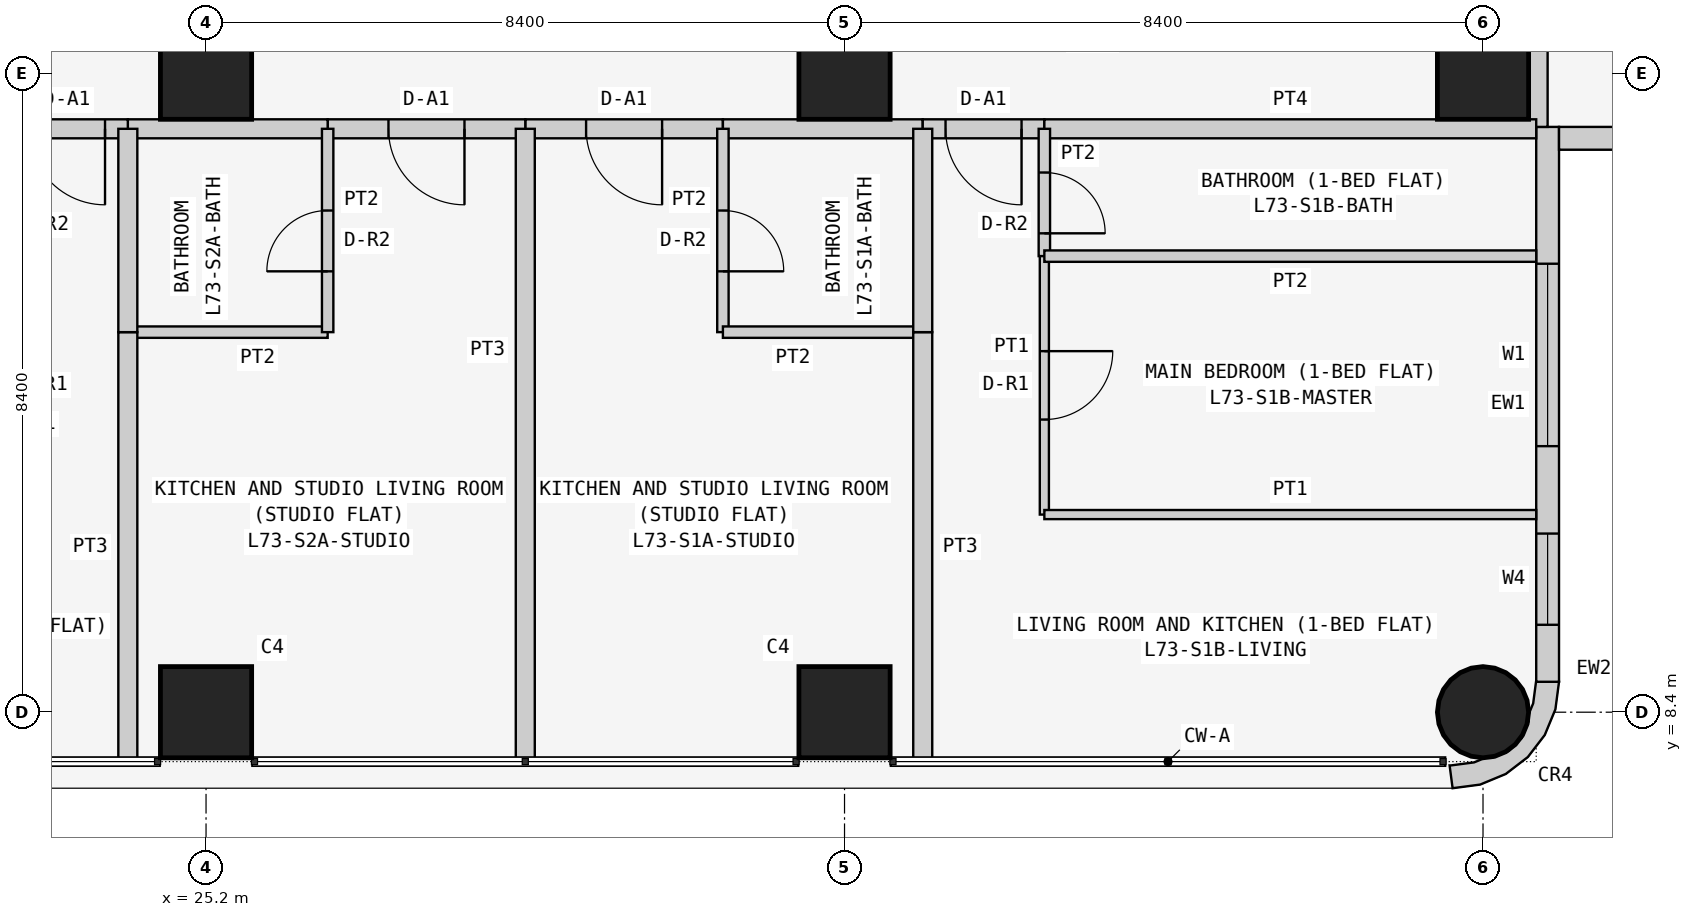
"""IFC4 building model, lengths in metres.
Left out: names, types, materials, properties, quantities, classifications, styles, units other than length and angle.
Written with IfcOpenShell. Run it as: python <this file> out.ifc"""

import sys

from ifc_helpers import new_model, si_unit, direction, frame, frame_2d, origin, origin_2d, place, context, subcontext, project, spatial, polyline, rectangle, circle, outline, extrude, element, fill, save


model = new_model("IFC4")
c1 = context("Model", 3, precision=1e-05, world=origin(), true_north=direction((0.0, 1.0)))
c2 = subcontext(c1, "Body", "Model", "MODEL_VIEW")
j1 = project(units=[si_unit("LENGTHUNIT", "METRE"), si_unit("PLANEANGLEUNIT", "RADIAN")], contexts=[c1])
p1 = place(None, origin())
s1 = spatial("IfcSite", under=j1, at=p1, CompositionType="ELEMENT")
p2 = place(p1, origin())
s2 = spatial("IfcBuilding", under=s1, at=p2, CompositionType="ELEMENT")
p3 = place(p2, frame((0.0, 0.0, 279.3)))
s3 = spatial("IfcBuildingStorey", under=s2, at=p3, CompositionType="ELEMENT", Elevation=279.3)
for number, where, z_axis, x_axis in (
    (1, (25.2, 8.4, 0.0), (0.0, 0.0, 1.0), (1.0, 0.0, 0.0)),
    (2, (25.2, 16.8, 0.0), (0.0, 0.0, 1.0), (1.0, 0.0, 0.0)),
    (3, (33.6, 8.4, 0.0), (0.0, 0.0, 1.0), (1.0, 0.0, 0.0)),
    (4, (33.6, 16.8, 0.0), (0.0, 0.0, 1.0), (1.0, 0.0, 0.0)),
):
    element("IfcColumn", number, at=place(p3, frame(where, z_axis=z_axis, x_axis=x_axis)), inside=s3, PredefinedType="COLUMN", context=c2, shape_type="SweptSolid", body=[
        extrude(rectangle(XDim=1.2, YDim=1.2, at=origin_2d()), origin(), (0.0, 0.0, 1.0), 3.6),
    ])
p4 = place(p3, frame((42.0, 8.4, 0.0), z_axis=(0.0, 0.0, 1.0), x_axis=(1.0, 0.0, 0.0)))
e5 = element("IfcColumn", 5, at=p4, inside=s3, PredefinedType="COLUMN", context=c2, shape_type="SweptSolid", body=[
    extrude(circle(Radius=0.6, at=origin_2d()), origin(), (0.0, 0.0, 1.0), 3.6),
])
p5 = place(p3, frame((42.0, 16.8, 0.0), z_axis=(0.0, 0.0, 1.0), x_axis=(1.0, 0.0, 0.0)))
e6 = element("IfcColumn", 6, at=p5, inside=s3, PredefinedType="COLUMN", context=c2, shape_type="SweptSolid", body=[
    extrude(rectangle(XDim=1.2, YDim=1.2, at=origin_2d()), origin(), (0.0, 0.0, 1.0), 3.6),
])
p6 = place(p3, frame((42.85, 8.8, 0.0), z_axis=(0.0, 0.0, 1.0), x_axis=(0.0, 1.0, 0.0)))
e7 = element("IfcWall", 7, at=p6, inside=s3, PredefinedType="SOLIDWALL", context=c2, shape_type="SweptSolid", body=[
    extrude(rectangle(XDim=7.3, YDim=0.3, at=frame_2d((3.65, 0.0))), origin(), (0.0, 0.0, 1.0), 3.45),
])
p7 = place(p6, frame((3.1, 0.0, 0.9)))
e8 = element("IfcOpeningElement", 8, at=p7, cuts=e7, PredefinedType="OPENING", context=c2, shape_type="SweptSolid", body=[
    extrude(rectangle(XDim=2.4, YDim=1.5, at=frame_2d((1.2, 0.75))), frame((0.0, 0.16, 0.0), z_axis=(0.0, -1.0, 0.0), x_axis=(1.0, 0.0, 0.0)), (0.0, 0.0, 1.0), 0.32),
])
p8 = place(p6, frame((0.75, 0.0, 0.9)))
e9 = element("IfcOpeningElement", 9, at=p8, cuts=e7, PredefinedType="OPENING", context=c2, shape_type="SweptSolid", body=[
    extrude(rectangle(XDim=1.2, YDim=1.5, at=frame_2d((0.6, 0.75))), frame((0.0, 0.16, 0.0), z_axis=(0.0, -1.0, 0.0), x_axis=(1.0, 0.0, 0.0)), (0.0, 0.0, 1.0), 0.32),
])
p9 = place(p3, frame((43.0, 15.95, 0.0), z_axis=(0.0, 0.0, 1.0), x_axis=(1.0, 0.0, 0.0)))
e10 = element("IfcWall", 10, at=p9, inside=s3, PredefinedType="SOLIDWALL", context=c2, shape_type="SweptSolid", body=[
    extrude(rectangle(XDim=7.0, YDim=0.3, at=frame_2d((3.5, 0.0))), origin(), (0.0, 0.0, 1.0), 3.45),
])
p10 = place(p9, frame((1.5, 0.0, 0.9)))
e11 = element("IfcOpeningElement", 11, at=p10, cuts=e10, PredefinedType="OPENING", context=c2, shape_type="SweptSolid", body=[
    extrude(rectangle(XDim=2.4, YDim=1.5, at=frame_2d((1.2, 0.75))), frame((0.0, 0.16, 0.0), z_axis=(0.0, -1.0, 0.0), x_axis=(1.0, 0.0, 0.0)), (0.0, 0.0, 1.0), 0.32),
])
p11 = place(p9, frame((5.05, 0.0, 0.9)))
e12 = element("IfcOpeningElement", 12, at=p11, cuts=e10, PredefinedType="OPENING", context=c2, shape_type="SweptSolid", body=[
    extrude(rectangle(XDim=1.2, YDim=1.5, at=frame_2d((0.6, 0.75))), frame((0.0, 0.16, 0.0), z_axis=(0.0, -1.0, 0.0), x_axis=(1.0, 0.0, 0.0)), (0.0, 0.0, 1.0), 0.32),
])
p12 = place(p3, frame((41.638, 7.824, 0.0), z_axis=(0.0, 0.0, 1.0), x_axis=(0.707106781187, -0.707106781187, 0.0)))
e13 = element("IfcWall", 13, at=p12, inside=s3, PredefinedType="SOLIDWALL", context=c2, shape_type="SweptSolid", body=[
    extrude(outline(polyline([(0.033, 1.469), (0.047, 1.455), (0.233, 1.212), (0.292, 1.069), (0.358, 1.003), (0.449, 0.782), (0.449, 0.543), (0.358, 0.322), (0.292, 0.257), (0.233, 0.114), (0.047, -0.129), (0.033, -0.143), (0.273, -0.327), (0.495, -0.037), (0.635, 0.301), (0.683, 0.663), (0.635, 1.025), (0.495, 1.363), (0.273, 1.653), (0.033, 1.469)])), origin(), (0.0, 0.0, 1.0), 3.45),
])
p13 = place(p3, frame((42.725, 22.971, 0.0), z_axis=(0.0, 0.0, 1.0), x_axis=(0.0, -1.0, 0.0)))
e14 = element("IfcWall", 14, at=p13, inside=s3, PredefinedType="PARTITIONING", context=c2, shape_type="SweptSolid", body=[
    extrude(rectangle(XDim=6.871, YDim=0.25, at=frame_2d((3.436, 0.0))), origin(), (0.0, 0.0, 1.0), 3.45),
])
p14 = place(p3, frame((32.0, 16.075, 0.0), z_axis=(0.0, 0.0, 1.0), x_axis=(-1.0, 0.0, 0.0)))
e15 = element("IfcWall", 15, at=p14, inside=s3, PredefinedType="PARTITIONING", context=c2, shape_type="SweptSolid", body=[
    extrude(rectangle(XDim=2.6, YDim=0.25, at=frame_2d((1.3, 0.0))), origin(), (0.0, 0.0, 1.0), 3.45),
])
p15 = place(p14, frame((0.8, 0.0, 0.0)))
e16 = element("IfcOpeningElement", 16, at=p15, cuts=e15, PredefinedType="OPENING", context=c2, shape_type="SweptSolid", body=[
    extrude(rectangle(XDim=1.0, YDim=2.1, at=frame_2d((0.5, 1.05))), frame((0.0, 0.135, 0.0), z_axis=(0.0, -1.0, 0.0), x_axis=(1.0, 0.0, 0.0)), (0.0, 0.0, 1.0), 0.27),
])
p16 = place(p3, frame((34.629, 16.075, 0.0), z_axis=(0.0, 0.0, 1.0), x_axis=(-1.0, 0.0, 0.0)))
e17 = element("IfcWall", 17, at=p16, inside=s3, PredefinedType="PARTITIONING", context=c2, shape_type="SweptSolid", body=[
    extrude(rectangle(XDim=2.629, YDim=0.25, at=frame_2d((1.314, 0.0))), origin(), (0.0, 0.0, 1.0), 3.45),
])
p17 = place(p3, frame((36.229, 16.075, 0.0), z_axis=(0.0, 0.0, 1.0), x_axis=(-1.0, 0.0, 0.0)))
e18 = element("IfcWall", 18, at=p17, inside=s3, PredefinedType="PARTITIONING", context=c2, shape_type="SweptSolid", body=[
    extrude(rectangle(XDim=1.6, YDim=0.25, at=frame_2d((0.8, 0.0))), origin(), (0.0, 0.0, 1.0), 3.45),
])
p18 = place(p17, frame((0.3, 0.0, 0.0)))
e19 = element("IfcOpeningElement", 19, at=p18, cuts=e18, PredefinedType="OPENING", context=c2, shape_type="SweptSolid", body=[
    extrude(rectangle(XDim=1.0, YDim=2.1, at=frame_2d((0.5, 1.05))), frame((0.0, 0.135, 0.0), z_axis=(0.0, -1.0, 0.0), x_axis=(1.0, 0.0, 0.0)), (0.0, 0.0, 1.0), 0.27),
])
p19 = place(p3, frame((42.7, 16.075, 0.0), z_axis=(0.0, 0.0, 1.0), x_axis=(-1.0, 0.0, 0.0)))
e20 = element("IfcWall", 20, at=p19, inside=s3, PredefinedType="PARTITIONING", context=c2, shape_type="SweptSolid", body=[
    extrude(rectangle(XDim=6.471, YDim=0.25, at=frame_2d((3.235, 0.0))), origin(), (0.0, 0.0, 1.0), 3.45),
])
p20 = place(p3, frame((29.4, 16.075, 0.0), z_axis=(0.0, 0.0, 1.0), x_axis=(-1.0, 0.0, 0.0)))
e21 = element("IfcWall", 21, at=p20, inside=s3, PredefinedType="PARTITIONING", context=c2, shape_type="SweptSolid", body=[
    extrude(rectangle(XDim=2.6, YDim=0.25, at=frame_2d((1.3, 0.0))), origin(), (0.0, 0.0, 1.0), 3.45),
])
p21 = place(p20, frame((0.8, 0.0, 0.0)))
e22 = element("IfcOpeningElement", 22, at=p21, cuts=e21, PredefinedType="OPENING", context=c2, shape_type="SweptSolid", body=[
    extrude(rectangle(XDim=1.0, YDim=2.1, at=frame_2d((0.5, 1.05))), frame((0.0, 0.135, 0.0), z_axis=(0.0, -1.0, 0.0), x_axis=(1.0, 0.0, 0.0)), (0.0, 0.0, 1.0), 0.27),
])
p22 = place(p3, frame((26.8, 16.075, 0.0), z_axis=(0.0, 0.0, 1.0), x_axis=(-1.0, 0.0, 0.0)))
e23 = element("IfcWall", 23, at=p22, inside=s3, PredefinedType="PARTITIONING", context=c2, shape_type="SweptSolid", body=[
    extrude(rectangle(XDim=2.629, YDim=0.25, at=frame_2d((1.314, 0.0))), origin(), (0.0, 0.0, 1.0), 3.45),
])
p23 = place(p3, frame((24.171, 16.075, 0.0), z_axis=(0.0, 0.0, 1.0), x_axis=(-1.0, 0.0, 0.0)))
e24 = element("IfcWall", 24, at=p23, inside=s3, PredefinedType="PARTITIONING", context=c2, shape_type="SweptSolid", body=[
    extrude(rectangle(XDim=1.6, YDim=0.25, at=frame_2d((0.8, 0.0))), origin(), (0.0, 0.0, 1.0), 3.45),
])
p24 = place(p23, frame((0.3, 0.0, 0.0)))
e25 = element("IfcOpeningElement", 25, at=p24, cuts=e24, PredefinedType="OPENING", context=c2, shape_type="SweptSolid", body=[
    extrude(rectangle(XDim=1.0, YDim=2.1, at=frame_2d((0.5, 1.05))), frame((0.0, 0.135, 0.0), z_axis=(0.0, -1.0, 0.0), x_axis=(1.0, 0.0, 0.0)), (0.0, 0.0, 1.0), 0.27),
])
p25 = place(p3, frame((32.0, 16.075, 0.0), z_axis=(0.0, 0.0, 1.0), x_axis=(0.0, -1.0, 0.0)))
e26 = element("IfcWall", 26, at=p25, inside=s3, PredefinedType="PARTITIONING", context=c2, shape_type="SweptSolid", body=[
    extrude(rectangle(XDim=2.675, YDim=0.15, at=frame_2d((1.337, 0.0))), origin(), (0.0, 0.0, 1.0), 3.45),
])
p26 = place(p25, frame((1.075, 0.0, 0.0)))
e27 = element("IfcOpeningElement", 27, at=p26, cuts=e26, PredefinedType="OPENING", context=c2, shape_type="SweptSolid", body=[
    extrude(rectangle(XDim=0.8, YDim=2.1, at=frame_2d((0.4, 1.05))), frame((0.0, 0.085, 0.0), z_axis=(0.0, -1.0, 0.0), x_axis=(1.0, 0.0, 0.0)), (0.0, 0.0, 1.0), 0.17),
])
p27 = place(p3, frame((32.0, 13.4, 0.0), z_axis=(0.0, 0.0, 1.0), x_axis=(1.0, 0.0, 0.0)))
e28 = element("IfcWall", 28, at=p27, inside=s3, PredefinedType="PARTITIONING", context=c2, shape_type="SweptSolid", body=[
    extrude(rectangle(XDim=2.629, YDim=0.15, at=frame_2d((1.314, 0.0))), origin(), (0.0, 0.0, 1.0), 3.45),
])
p28 = place(p3, frame((34.629, 13.4, 0.0), z_axis=(0.0, 0.0, 1.0), x_axis=(0.0, -1.0, 0.0)))
e29 = element("IfcWall", 29, at=p28, inside=s3, PredefinedType="PARTITIONING", context=c2, shape_type="SweptSolid", body=[
    extrude(rectangle(XDim=5.65, YDim=0.25, at=frame_2d((2.825, 0.0))), origin(), (0.0, 0.0, 1.0), 3.45),
])
p29 = place(p3, frame((29.4, 7.75, 0.0), z_axis=(0.0, 0.0, 1.0), x_axis=(0.0, 1.0, 0.0)))
e30 = element("IfcWall", 30, at=p29, inside=s3, PredefinedType="PARTITIONING", context=c2, shape_type="SweptSolid", body=[
    extrude(rectangle(XDim=8.325, YDim=0.25, at=frame_2d((4.163, 0.0))), origin(), (0.0, 0.0, 1.0), 2.848),
])
p30 = place(p3, frame((34.629, 13.4, 0.0), z_axis=(0.0, 0.0, 1.0), x_axis=(0.0, 1.0, 0.0)))
e31 = element("IfcWall", 31, at=p30, inside=s3, PredefinedType="PARTITIONING", context=c2, shape_type="SweptSolid", body=[
    extrude(rectangle(XDim=2.675, YDim=0.25, at=frame_2d((1.337, 0.0))), origin(), (0.0, 0.0, 1.0), 3.45),
])
p31 = place(p3, frame((36.229, 16.075, 0.0), z_axis=(0.0, 0.0, 1.0), x_axis=(0.0, -1.0, 0.0)))
e32 = element("IfcWall", 32, at=p31, inside=s3, PredefinedType="PARTITIONING", context=c2, shape_type="SweptSolid", body=[
    extrude(rectangle(XDim=1.675, YDim=0.15, at=frame_2d((0.837, 0.0))), origin(), (0.0, 0.0, 1.0), 3.45),
])
p32 = place(p31, frame((0.575, 0.0, 0.0)))
e33 = element("IfcOpeningElement", 33, at=p32, cuts=e32, PredefinedType="OPENING", context=c2, shape_type="SweptSolid", body=[
    extrude(rectangle(XDim=0.8, YDim=2.1, at=frame_2d((0.4, 1.05))), frame((0.0, 0.085, 0.0), z_axis=(0.0, -1.0, 0.0), x_axis=(1.0, 0.0, 0.0)), (0.0, 0.0, 1.0), 0.17),
])
p33 = place(p3, frame((36.229, 14.4, 0.0), z_axis=(0.0, 0.0, 1.0), x_axis=(0.0, -1.0, 0.0)))
e34 = element("IfcWall", 34, at=p33, inside=s3, PredefinedType="PARTITIONING", context=c2, shape_type="SweptSolid", body=[
    extrude(rectangle(XDim=3.4, YDim=0.12, at=frame_2d((1.7, 0.0))), origin(), (0.0, 0.0, 1.0), 3.45),
])
p34 = place(p33, frame((1.25, 0.0, 0.0)))
e35 = element("IfcOpeningElement", 35, at=p34, cuts=e34, PredefinedType="OPENING", context=c2, shape_type="SweptSolid", body=[
    extrude(rectangle(XDim=0.9, YDim=2.1, at=frame_2d((0.45, 1.05))), frame((0.0, 0.07, 0.0), z_axis=(0.0, -1.0, 0.0), x_axis=(1.0, 0.0, 0.0)), (0.0, 0.0, 1.0), 0.14),
])
p35 = place(p3, frame((36.229, 11.0, 0.0), z_axis=(0.0, 0.0, 1.0), x_axis=(1.0, 0.0, 0.0)))
e36 = element("IfcWall", 36, at=p35, inside=s3, PredefinedType="PARTITIONING", context=c2, shape_type="SweptSolid", body=[
    extrude(rectangle(XDim=6.471, YDim=0.12, at=frame_2d((3.235, 0.0))), origin(), (0.0, 0.0, 1.0), 3.45),
])
p36 = place(p3, frame((36.229, 14.4, 0.0), z_axis=(0.0, 0.0, 1.0), x_axis=(1.0, 0.0, 0.0)))
e37 = element("IfcWall", 37, at=p36, inside=s3, PredefinedType="PARTITIONING", context=c2, shape_type="SweptSolid", body=[
    extrude(rectangle(XDim=6.471, YDim=0.15, at=frame_2d((3.235, 0.0))), origin(), (0.0, 0.0, 1.0), 3.45),
])
p37 = place(p3, frame((24.171, 13.4, 0.0), z_axis=(0.0, 0.0, 1.0), x_axis=(1.0, 0.0, 0.0)))
e38 = element("IfcWall", 38, at=p37, inside=s3, PredefinedType="PARTITIONING", context=c2, shape_type="SweptSolid", body=[
    extrude(rectangle(XDim=2.629, YDim=0.15, at=frame_2d((1.314, 0.0))), origin(), (0.0, 0.0, 1.0), 3.45),
])
p38 = place(p3, frame((26.8, 13.4, 0.0), z_axis=(0.0, 0.0, 1.0), x_axis=(0.0, 1.0, 0.0)))
e39 = element("IfcWall", 39, at=p38, inside=s3, PredefinedType="PARTITIONING", context=c2, shape_type="SweptSolid", body=[
    extrude(rectangle(XDim=2.675, YDim=0.15, at=frame_2d((1.337, 0.0))), origin(), (0.0, 0.0, 1.0), 3.45),
])
p39 = place(p38, frame((0.8, 0.0, 0.0)))
e40 = element("IfcOpeningElement", 40, at=p39, cuts=e39, PredefinedType="OPENING", context=c2, shape_type="SweptSolid", body=[
    extrude(rectangle(XDim=0.8, YDim=2.1, at=frame_2d((0.4, 1.05))), frame((0.0, 0.085, 0.0), z_axis=(0.0, -1.0, 0.0), x_axis=(1.0, 0.0, 0.0)), (0.0, 0.0, 1.0), 0.17),
])
p40 = place(p3, frame((24.171, 7.75, 0.0), z_axis=(0.0, 0.0, 1.0), x_axis=(0.0, 1.0, 0.0)))
e41 = element("IfcWall", 41, at=p40, inside=s3, PredefinedType="PARTITIONING", context=c2, shape_type="SweptSolid", body=[
    extrude(rectangle(XDim=5.65, YDim=0.25, at=frame_2d((2.825, 0.0))), origin(), (0.0, 0.0, 1.0), 3.45),
])
p41 = place(p3, frame((24.171, 13.4, 0.0), z_axis=(0.0, 0.0, 1.0), x_axis=(0.0, 1.0, 0.0)))
e42 = element("IfcWall", 42, at=p41, inside=s3, PredefinedType="PARTITIONING", context=c2, shape_type="SweptSolid", body=[
    extrude(rectangle(XDim=2.675, YDim=0.25, at=frame_2d((1.337, 0.0))), origin(), (0.0, 0.0, 1.0), 3.45),
])
p42 = place(p7, origin())
e43 = element("IfcWindow", 43, at=p42, inside=s3, PartitioningType="SINGLE_PANEL", PredefinedType="WINDOW", context=c2, shape_type="SweptSolid", body=[
    extrude(rectangle(XDim=2.4, YDim=1.5, at=frame_2d((1.2, 0.75))), frame((0.0, 0.03, 0.0), z_axis=(0.0, -1.0, 0.0), x_axis=(1.0, 0.0, 0.0)), (0.0, 0.0, 1.0), 0.06),
])
fill(e8, e43)
p43 = place(p8, origin())
e44 = element("IfcWindow", 44, at=p43, inside=s3, PartitioningType="SINGLE_PANEL", PredefinedType="WINDOW", context=c2, shape_type="SweptSolid", body=[
    extrude(rectangle(XDim=1.2, YDim=1.5, at=frame_2d((0.6, 0.75))), frame((0.0, 0.03, 0.0), z_axis=(0.0, -1.0, 0.0), x_axis=(1.0, 0.0, 0.0)), (0.0, 0.0, 1.0), 0.06),
])
fill(e9, e44)
p44 = place(p15, origin())
e45 = element("IfcDoor", 45, at=p44, inside=s3, OperationType="SINGLE_SWING_LEFT", PredefinedType="DOOR", context=c2, shape_type="SweptSolid", body=[
    extrude(rectangle(XDim=1.0, YDim=2.1, at=frame_2d((0.5, 1.05))), frame((0.0, 0.025, 0.0), z_axis=(0.0, -1.0, 0.0), x_axis=(1.0, 0.0, 0.0)), (0.0, 0.0, 1.0), 0.05),
])
fill(e16, e45)
p45 = place(p26, origin())
e46 = element("IfcDoor", 46, at=p45, inside=s3, OperationType="SINGLE_SWING_RIGHT", PredefinedType="DOOR", context=c2, shape_type="SweptSolid", body=[
    extrude(rectangle(XDim=0.8, YDim=2.1, at=frame_2d((0.4, 1.05))), frame((0.0, 0.025, 0.0), z_axis=(0.0, -1.0, 0.0), x_axis=(1.0, 0.0, 0.0)), (0.0, 0.0, 1.0), 0.05),
])
fill(e27, e46)
p46 = place(p18, origin())
e47 = element("IfcDoor", 47, at=p46, inside=s3, OperationType="SINGLE_SWING_LEFT", PredefinedType="DOOR", context=c2, shape_type="SweptSolid", body=[
    extrude(rectangle(XDim=1.0, YDim=2.1, at=frame_2d((0.5, 1.05))), frame((0.0, 0.025, 0.0), z_axis=(0.0, -1.0, 0.0), x_axis=(1.0, 0.0, 0.0)), (0.0, 0.0, 1.0), 0.05),
])
fill(e19, e47)
p47 = place(p32, origin())
e48 = element("IfcDoor", 48, at=p47, inside=s3, OperationType="SINGLE_SWING_RIGHT", PredefinedType="DOOR", context=c2, shape_type="SweptSolid", body=[
    extrude(rectangle(XDim=0.8, YDim=2.1, at=frame_2d((0.4, 1.05))), frame((0.0, 0.025, 0.0), z_axis=(0.0, -1.0, 0.0), x_axis=(1.0, 0.0, 0.0)), (0.0, 0.0, 1.0), 0.05),
])
fill(e33, e48)
p48 = place(p34, origin())
e49 = element("IfcDoor", 49, at=p48, inside=s3, OperationType="SINGLE_SWING_LEFT", PredefinedType="DOOR", context=c2, shape_type="SweptSolid", body=[
    extrude(rectangle(XDim=0.9, YDim=2.1, at=frame_2d((0.45, 1.05))), frame((0.0, 0.025, 0.0), z_axis=(0.0, -1.0, 0.0), x_axis=(1.0, 0.0, 0.0)), (0.0, 0.0, 1.0), 0.05),
])
fill(e35, e49)
p49 = place(p21, origin())
e50 = element("IfcDoor", 50, at=p49, inside=s3, OperationType="SINGLE_SWING_LEFT", PredefinedType="DOOR", context=c2, shape_type="SweptSolid", body=[
    extrude(rectangle(XDim=1.0, YDim=2.1, at=frame_2d((0.5, 1.05))), frame((0.0, 0.025, 0.0), z_axis=(0.0, -1.0, 0.0), x_axis=(1.0, 0.0, 0.0)), (0.0, 0.0, 1.0), 0.05),
])
fill(e22, e50)
p50 = place(p39, origin())
e51 = element("IfcDoor", 51, at=p50, inside=s3, OperationType="SINGLE_SWING_LEFT", PredefinedType="DOOR", context=c2, shape_type="SweptSolid", body=[
    extrude(rectangle(XDim=0.8, YDim=2.1, at=frame_2d((0.4, 1.05))), frame((0.0, 0.025, 0.0), z_axis=(0.0, -1.0, 0.0), x_axis=(1.0, 0.0, 0.0)), (0.0, 0.0, 1.0), 0.05),
])
fill(e40, e51)
p51 = place(p24, origin())
e52 = element("IfcDoor", 52, at=p51, inside=s3, OperationType="SINGLE_SWING_LEFT", PredefinedType="DOOR", context=c2, shape_type="SweptSolid", body=[
    extrude(rectangle(XDim=1.0, YDim=2.1, at=frame_2d((0.5, 1.05))), frame((0.0, 0.025, 0.0), z_axis=(0.0, -1.0, 0.0), x_axis=(1.0, 0.0, 0.0)), (0.0, 0.0, 1.0), 0.05),
])
fill(e25, e52)
save(model, sys.argv[1])
